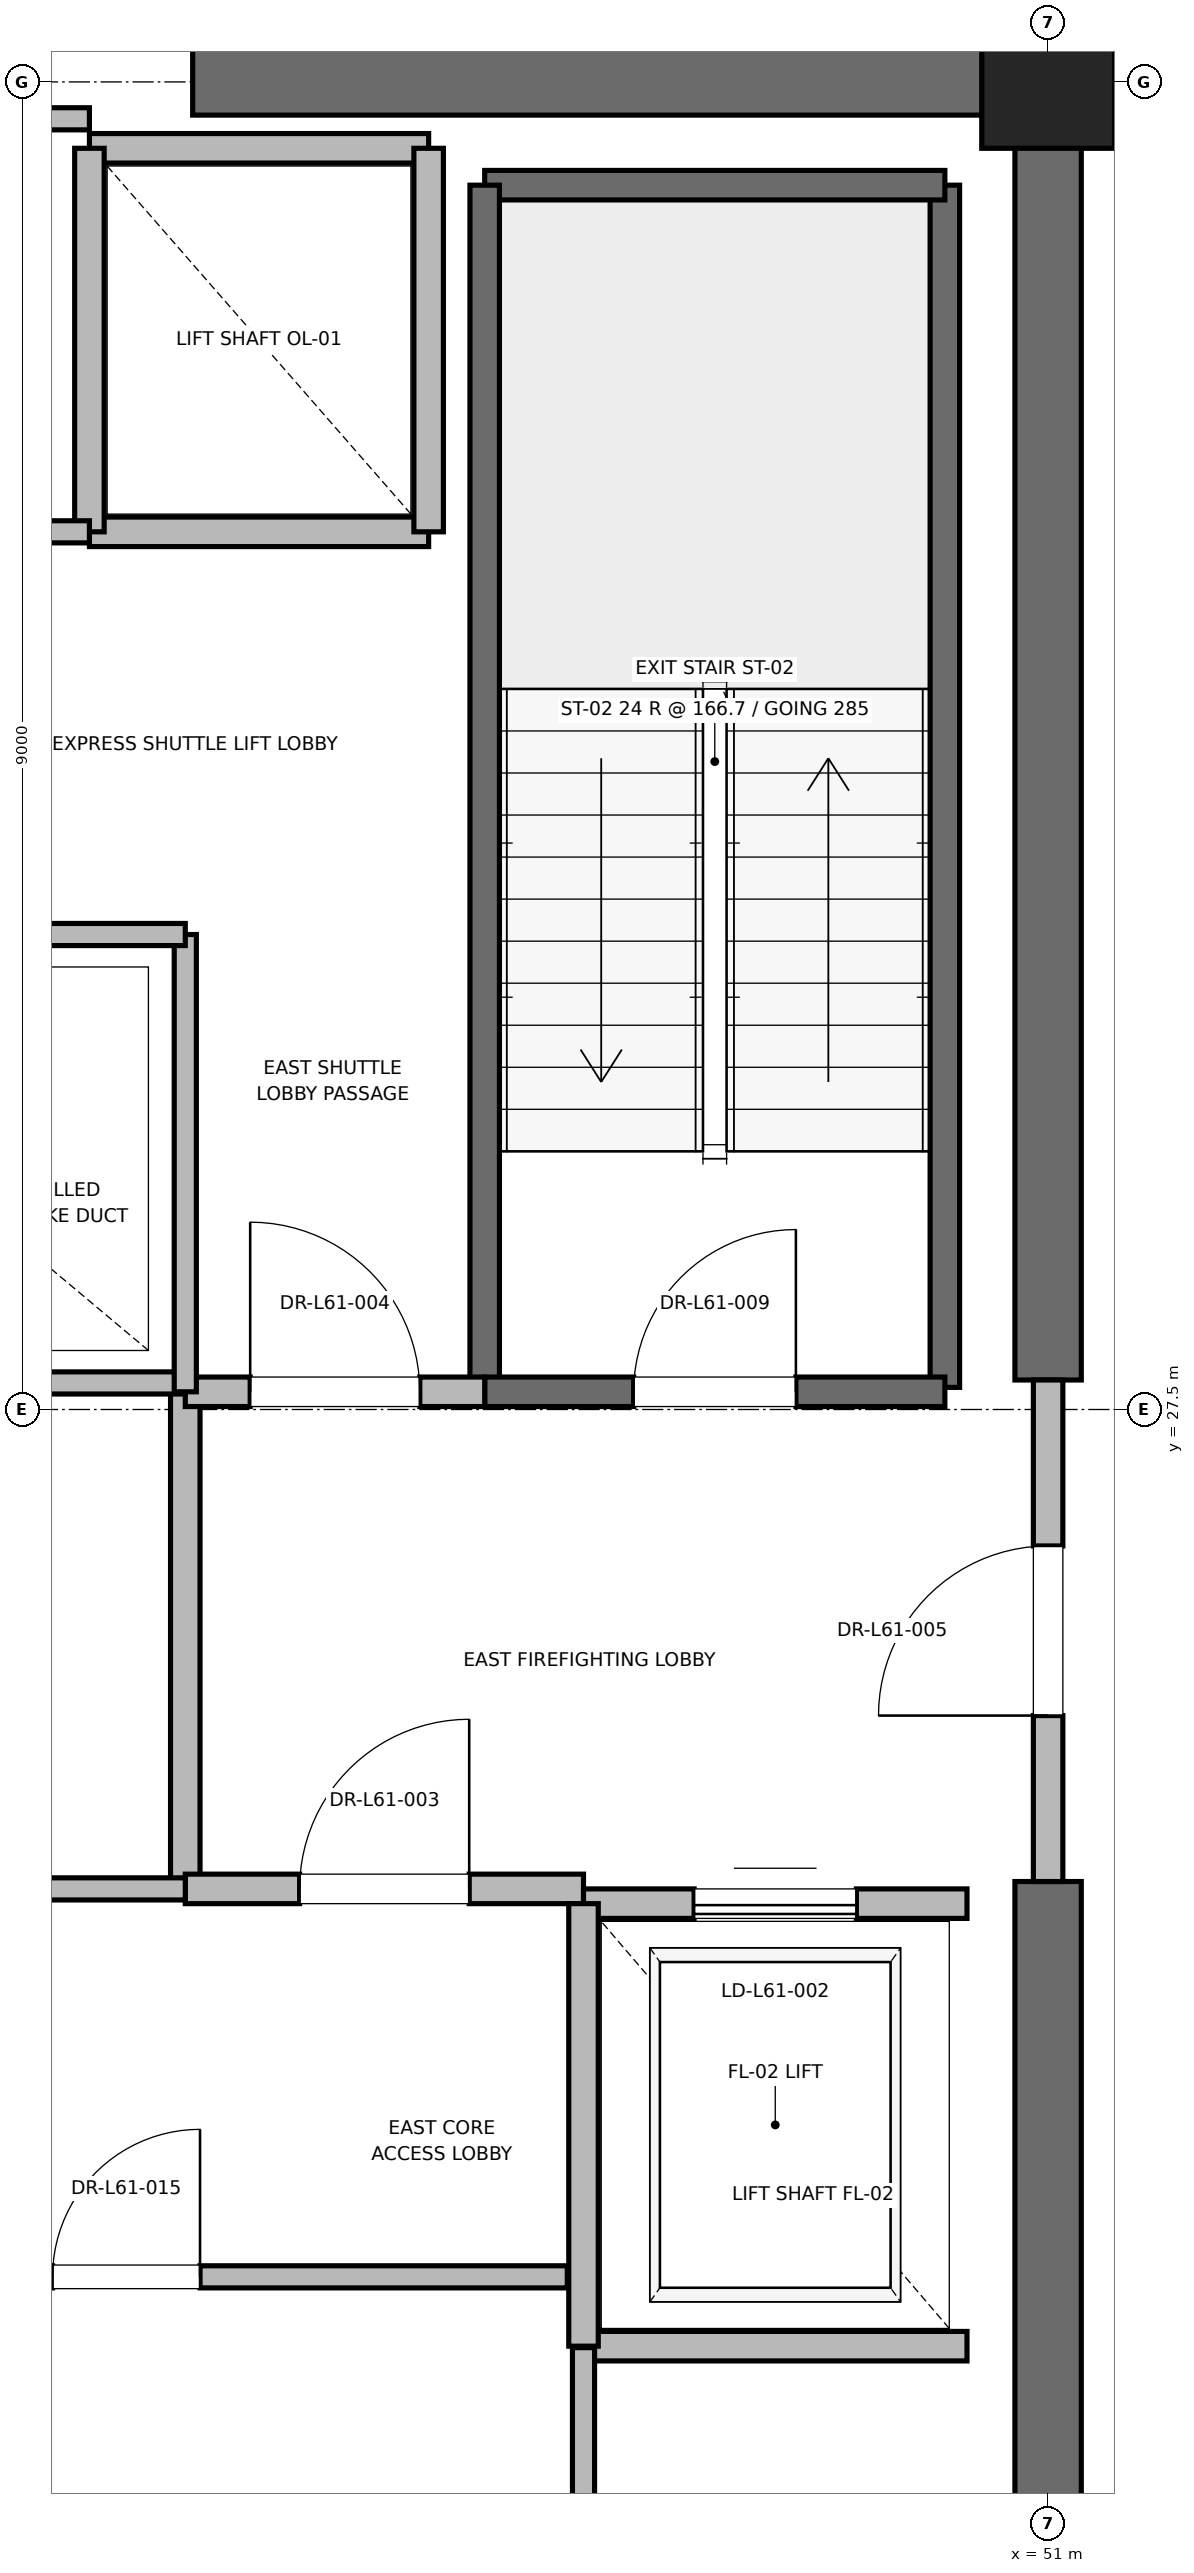
"""IFC4 building model, lengths in metres.
Left out: names, types, materials, properties, quantities, classifications, styles, units other than length and angle.
Written with IfcOpenShell. Run it as: python <this file> out.ifc"""

import sys

from ifc_helpers import new_model, si_unit, direction, frame, frame_2d, origin, origin_2d, place, context, subcontext, project, spatial, rectangle, extrude, element, fill, save


model = new_model("IFC4")
c1 = context("Model", 3, precision=1e-05, world=origin(), true_north=direction((0.0, 1.0)))
c2 = subcontext(c1, "Body", "Model", "MODEL_VIEW")
j1 = project(units=[si_unit("LENGTHUNIT", "METRE"), si_unit("PLANEANGLEUNIT", "RADIAN")], contexts=[c1])
p1 = place(None, origin())
s1 = spatial("IfcSite", under=j1, at=p1, CompositionType="ELEMENT")
p2 = place(p1, origin())
s2 = spatial("IfcBuilding", under=s1, at=p2, CompositionType="ELEMENT")
p3 = place(p2, frame((0.0, 0.0, 263.2)))
s3 = spatial("IfcBuildingStorey", under=s2, at=p3, CompositionType="ELEMENT", Elevation=263.2)
p4 = place(p3, frame((51.0, 36.5, 0.0), z_axis=(0.0, 0.0, 1.0), x_axis=(1.0, 0.0, 0.0)))
e1 = element("IfcColumn", 1, at=p4, inside=s3, PredefinedType="PILASTER", context=c2, shape_type="SweptSolid", body=[
    extrude(rectangle(XDim=0.9, YDim=0.9, at=origin_2d()), origin(), (0.0, 0.0, 1.0), 4.0),
])
for number, where, z_axis, x_axis in (
    (2, (45.2, 36.5, 0.0), (0.0, 0.0, 1.0), (1.0, 0.0, 0.0)),
    (3, (51.0, 18.5, 0.0), (0.0, 0.0, 1.0), (0.0, 1.0, 0.0)),
):
    element("IfcWall", number, at=place(p3, frame(where, z_axis=z_axis, x_axis=x_axis)), inside=s3, PredefinedType="SHEAR", context=c2, shape_type="SweptSolid", body=[
        extrude(rectangle(XDim=5.8, YDim=0.45, at=frame_2d((2.9, 0.0))), origin(), (0.0, 0.0, 1.0), 3.785),
    ])
p5 = place(p3, frame((51.0, 27.7, 0.0), z_axis=(0.0, 0.0, 1.0), x_axis=(0.0, 1.0, 0.0)))
e4 = element("IfcWall", 4, at=p5, inside=s3, PredefinedType="SHEAR", context=c2, shape_type="SweptSolid", body=[
    extrude(rectangle(XDim=8.8, YDim=0.45, at=frame_2d((4.4, 0.0))), origin(), (0.0, 0.0, 1.0), 3.785),
])
p6 = place(p3, frame((50.3, 27.65, 0.0), z_axis=(0.0, 0.0, 1.0), x_axis=(0.0, 1.0, 0.0)))
e5 = element("IfcWall", 5, at=p6, inside=s3, PredefinedType="SOLIDWALL", context=c2, shape_type="SweptSolid", body=[
    extrude(rectangle(XDim=8.15, YDim=0.2, at=frame_2d((4.075, 0.0))), origin(), (0.0, 0.0, 1.0), 3.785),
])
p7 = place(p3, frame((47.18, 35.8, 0.0), z_axis=(0.0, 0.0, 1.0), x_axis=(1.0, 0.0, 0.0)))
e6 = element("IfcWall", 6, at=p7, inside=s3, PredefinedType="SOLIDWALL", context=c2, shape_type="SweptSolid", body=[
    extrude(rectangle(XDim=3.12, YDim=0.2, at=frame_2d((1.56, 0.0))), origin(), (0.0, 0.0, 1.0), 3.785),
])
p8 = place(p3, frame((47.18, 27.62, 0.0), z_axis=(0.0, 0.0, 1.0), x_axis=(0.0, 1.0, 0.0)))
e7 = element("IfcWall", 7, at=p8, inside=s3, PredefinedType="SOLIDWALL", context=c2, shape_type="SweptSolid", body=[
    extrude(rectangle(XDim=8.18, YDim=0.2, at=frame_2d((4.09, 0.0))), origin(), (0.0, 0.0, 1.0), 3.785),
])
p9 = place(p3, frame((47.18, 27.62, 0.0), z_axis=(0.0, 0.0, 1.0), x_axis=(1.0, 0.0, 0.0)))
e8 = element("IfcWall", 8, at=p9, inside=s3, PredefinedType="SOLIDWALL", context=c2, shape_type="SweptSolid", body=[
    extrude(rectangle(XDim=3.12, YDim=0.2, at=frame_2d((1.56, 0.0))), origin(), (0.0, 0.0, 1.0), 3.785),
])
p10 = place(p9, frame((1.01, 0.0, 0.0)))
e9 = element("IfcOpeningElement", 9, at=p10, cuts=e8, PredefinedType="OPENING", context=c2, shape_type="SweptSolid", body=[
    extrude(rectangle(XDim=1.1, YDim=2.15, at=frame_2d((0.55, 1.075))), frame((0.0, 0.1, 0.0), z_axis=(0.0, -1.0, 0.0), x_axis=(1.0, 0.0, 0.0)), (0.0, 0.0, 1.0), 0.2),
])
p11 = place(p3, frame((45.15, 24.25, 0.0), z_axis=(0.0, 0.0, 1.0), x_axis=(0.0, 1.0, 0.0)))
e10 = element("IfcWall", 10, at=p11, inside=s3, PredefinedType="PARTITIONING", context=c2, shape_type="SweptSolid", body=[
    extrude(rectangle(XDim=3.37, YDim=0.2, at=frame_2d((1.685, 0.0))), origin(), (0.0, 0.0, 1.0), 3.785),
])
p12 = place(p3, frame((45.15, 24.25, 0.0), z_axis=(0.0, 0.0, 1.0), x_axis=(1.0, 0.0, 0.0)))
e11 = element("IfcWall", 11, at=p12, inside=s3, PredefinedType="PARTITIONING", context=c2, shape_type="SweptSolid", body=[
    extrude(rectangle(XDim=2.7, YDim=0.2, at=frame_2d((1.35, 0.0))), origin(), (0.0, 0.0, 1.0), 3.785),
])
p13 = place(p12, frame((0.775, 0.0, 0.0)))
e12 = element("IfcOpeningElement", 12, at=p13, cuts=e11, PredefinedType="OPENING", context=c2, shape_type="SweptSolid", body=[
    extrude(rectangle(XDim=1.15, YDim=2.2, at=frame_2d((0.575, 1.1))), frame((0.0, 0.1, 0.0), z_axis=(0.0, -1.0, 0.0), x_axis=(1.0, 0.0, 0.0)), (0.0, 0.0, 1.0), 0.2),
])
p14 = place(p3, frame((45.15, 27.62, 0.0), z_axis=(0.0, 0.0, 1.0), x_axis=(1.0, 0.0, 0.0)))
e13 = element("IfcWall", 13, at=p14, inside=s3, PredefinedType="PARTITIONING", context=c2, shape_type="SweptSolid", body=[
    extrude(rectangle(XDim=2.03, YDim=0.2, at=frame_2d((1.015, 0.0))), origin(), (0.0, 0.0, 1.0), 3.785),
])
p15 = place(p14, frame((0.44, 0.0, 0.0)))
e14 = element("IfcOpeningElement", 14, at=p15, cuts=e13, PredefinedType="OPENING", context=c2, shape_type="SweptSolid", body=[
    extrude(rectangle(XDim=1.15, YDim=2.2, at=frame_2d((0.575, 1.1))), frame((0.0, 0.1, 0.0), z_axis=(0.0, -1.0, 0.0), x_axis=(1.0, 0.0, 0.0)), (0.0, 0.0, 1.0), 0.2),
])
p16 = place(p3, frame((51.0, 24.3, 0.0), z_axis=(0.0, 0.0, 1.0), x_axis=(0.0, 1.0, 0.0)))
e15 = element("IfcWall", 15, at=p16, inside=s3, PredefinedType="PARTITIONING", context=c2, shape_type="SweptSolid", body=[
    extrude(rectangle(XDim=3.4, YDim=0.2, at=frame_2d((1.7, 0.0))), origin(), (0.0, 0.0, 1.0), 2.865),
])
p17 = place(p16, frame((1.125, 0.0, 0.0)))
e16 = element("IfcOpeningElement", 16, at=p17, cuts=e15, PredefinedType="OPENING", context=c2, shape_type="SweptSolid", body=[
    extrude(rectangle(XDim=1.15, YDim=2.2, at=frame_2d((0.575, 1.1))), frame((0.0, 0.1, 0.0), z_axis=(0.0, -1.0, 0.0), x_axis=(1.0, 0.0, 0.0)), (0.0, 0.0, 1.0), 0.2),
])
p18 = place(p3, frame((47.85, 21.15, 0.0), z_axis=(0.0, 0.0, 1.0), x_axis=(1.0, 0.0, 0.0)))
e17 = element("IfcWall", 17, at=p18, inside=s3, PredefinedType="SOLIDWALL", context=c2, shape_type="SweptSolid", body=[
    extrude(rectangle(XDim=2.6, YDim=0.2, at=frame_2d((1.3, 0.0))), origin(), (0.0, 0.0, 1.0), 3.785),
])
p19 = place(p3, frame((50.45, 24.15, 0.0), z_axis=(0.0, 0.0, 1.0), x_axis=(-1.0, 0.0, 0.0)))
e18 = element("IfcWall", 18, at=p19, inside=s3, PredefinedType="SOLIDWALL", context=c2, shape_type="SweptSolid", body=[
    extrude(rectangle(XDim=2.6, YDim=0.2, at=frame_2d((1.3, 0.0))), origin(), (0.0, 0.0, 1.0), 2.865),
])
p20 = place(p19, frame((0.75, 0.0, 0.0)))
e19 = element("IfcOpeningElement", 19, at=p20, cuts=e18, PredefinedType="OPENING", context=c2, shape_type="SweptSolid", body=[
    extrude(rectangle(XDim=1.1, YDim=2.2, at=frame_2d((0.55, 1.1))), frame((0.0, 0.1, 0.0), z_axis=(0.0, -1.0, 0.0), x_axis=(1.0, 0.0, 0.0)), (0.0, 0.0, 1.0), 0.2),
])
p21 = place(p3, frame((47.85, 24.15, 0.0), z_axis=(0.0, 0.0, 1.0), x_axis=(0.0, -1.0, 0.0)))
e20 = element("IfcWall", 20, at=p21, inside=s3, PredefinedType="SOLIDWALL", context=c2, shape_type="SweptSolid", body=[
    extrude(rectangle(XDim=3.0, YDim=0.2, at=frame_2d((1.5, 0.0))), origin(), (0.0, 0.0, 1.0), 3.785),
])
p22 = place(p3, frame((44.5, 33.45, 0.0), z_axis=(0.0, 0.0, 1.0), x_axis=(1.0, 0.0, 0.0)))
e21 = element("IfcWall", 21, at=p22, inside=s3, PredefinedType="SOLIDWALL", context=c2, shape_type="SweptSolid", body=[
    extrude(rectangle(XDim=2.3, YDim=0.2, at=frame_2d((1.15, 0.0))), origin(), (0.0, 0.0, 1.0), 3.785),
])
p23 = place(p3, frame((46.8, 36.05, 0.0), z_axis=(0.0, 0.0, 1.0), x_axis=(-1.0, 0.0, 0.0)))
e22 = element("IfcWall", 22, at=p23, inside=s3, PredefinedType="SOLIDWALL", context=c2, shape_type="SweptSolid", body=[
    extrude(rectangle(XDim=2.3, YDim=0.2, at=frame_2d((1.15, 0.0))), origin(), (0.0, 0.0, 1.0), 2.865),
])
p24 = place(p3, frame((44.5, 36.05, 0.0), z_axis=(0.0, 0.0, 1.0), x_axis=(0.0, -1.0, 0.0)))
e23 = element("IfcWall", 23, at=p24, inside=s3, PredefinedType="SOLIDWALL", context=c2, shape_type="SweptSolid", body=[
    extrude(rectangle(XDim=2.6, YDim=0.2, at=frame_2d((1.3, 0.0))), origin(), (0.0, 0.0, 1.0), 2.865),
])
p25 = place(p3, frame((46.8, 33.45, 0.0), z_axis=(0.0, 0.0, 1.0), x_axis=(0.0, 1.0, 0.0)))
e24 = element("IfcWall", 24, at=p25, inside=s3, PredefinedType="SOLIDWALL", context=c2, shape_type="SweptSolid", body=[
    extrude(rectangle(XDim=2.6, YDim=0.2, at=frame_2d((1.3, 0.0))), origin(), (0.0, 0.0, 1.0), 3.785),
])
p26 = place(p3, frame((41.56, 27.68, 0.0), z_axis=(0.0, 0.0, 1.0), x_axis=(1.0, 0.0, 0.0)))
e25 = element("IfcWall", 25, at=p26, inside=s3, PredefinedType="PARTITIONING", context=c2, shape_type="SweptSolid", body=[
    extrude(rectangle(XDim=3.59, YDim=0.15, at=frame_2d((1.795, 0.0))), origin(), (0.0, 0.0, 1.0), 2.85),
])
p27 = place(p3, frame((47.85, 18.6, 0.0), z_axis=(0.0, 0.0, 1.0), x_axis=(0.0, 1.0, 0.0)))
e26 = element("IfcWall", 26, at=p27, inside=s3, PredefinedType="PARTITIONING", context=c2, shape_type="SweptSolid", body=[
    extrude(rectangle(XDim=2.54, YDim=0.15, at=frame_2d((1.27, 0.0))), origin(), (0.0, 0.0, 1.0), 2.85),
])
p28 = place(p3, frame((41.76, 21.62, 0.0), z_axis=(0.0, 0.0, 1.0), x_axis=(1.0, 0.0, 0.0)))
e27 = element("IfcWall", 27, at=p28, inside=s3, PredefinedType="PARTITIONING", context=c2, shape_type="SweptSolid", body=[
    extrude(rectangle(XDim=5.98, YDim=0.15, at=frame_2d((2.99, 0.0))), origin(), (0.0, 0.0, 1.0), 2.85),
])
p29 = place(p28, frame((2.49, 0.0, 0.0)))
e28 = element("IfcOpeningElement", 28, at=p29, cuts=e27, PredefinedType="OPENING", context=c2, shape_type="SweptSolid", body=[
    extrude(rectangle(XDim=1.0, YDim=2.15, at=frame_2d((0.5, 1.075))), frame((0.0, 0.075, 0.0), z_axis=(0.0, -1.0, 0.0), x_axis=(1.0, 0.0, 0.0)), (0.0, 0.0, 1.0), 0.15),
])
p30 = place(p3, frame((41.76, 24.25, 0.0), z_axis=(0.0, 0.0, 1.0), x_axis=(1.0, 0.0, 0.0)))
e29 = element("IfcWall", 29, at=p30, inside=s3, PredefinedType="PARTITIONING", context=c2, shape_type="SweptSolid", body=[
    extrude(rectangle(XDim=3.39, YDim=0.15, at=frame_2d((1.695, 0.0))), origin(), (0.0, 0.0, 1.0), 2.85),
])
p31 = place(p30, frame((1.195, 0.0, 0.0)))
e30 = element("IfcOpeningElement", 30, at=p31, cuts=e29, PredefinedType="OPENING", context=c2, shape_type="SweptSolid", body=[
    extrude(rectangle(XDim=1.0, YDim=2.15, at=frame_2d((0.5, 1.075))), frame((0.0, 0.075, 0.0), z_axis=(0.0, -1.0, 0.0), x_axis=(1.0, 0.0, 0.0)), (0.0, 0.0, 1.0), 0.15),
])
p32 = place(p3, frame((45.15, 27.62, 0.0), z_axis=(0.0, 0.0, 1.0), x_axis=(0.0, 1.0, 0.0)))
e31 = element("IfcWall", 31, at=p32, inside=s3, PredefinedType="PARTITIONING", context=c2, shape_type="SweptSolid", body=[
    extrude(rectangle(XDim=3.1, YDim=0.15, at=frame_2d((1.55, 0.0))), origin(), (0.0, 0.0, 1.0), 2.85),
])
p33 = place(p3, frame((41.56, 30.72, 0.0), z_axis=(0.0, 0.0, 1.0), x_axis=(1.0, 0.0, 0.0)))
e32 = element("IfcWall", 32, at=p33, inside=s3, PredefinedType="PARTITIONING", context=c2, shape_type="SweptSolid", body=[
    extrude(rectangle(XDim=3.59, YDim=0.15, at=frame_2d((1.795, 0.0))), origin(), (0.0, 0.0, 1.0), 2.85),
])
p34 = place(p33, frame((1.355, 0.0, 0.0)))
e33 = element("IfcOpeningElement", 33, at=p34, cuts=e32, PredefinedType="OPENING", context=c2, shape_type="SweptSolid", body=[
    extrude(rectangle(XDim=0.88, YDim=2.1, at=frame_2d((0.44, 1.05))), frame((0.0, 0.075, 0.0), z_axis=(0.0, -1.0, 0.0), x_axis=(1.0, 0.0, 0.0)), (0.0, 0.0, 1.0), 0.15),
])
p35 = place(p3, frame((41.56, 36.25, 0.0), z_axis=(0.0, 0.0, 1.0), x_axis=(1.0, 0.0, 0.0)))
e34 = element("IfcWall", 34, at=p35, inside=s3, PredefinedType="PARTITIONING", context=c2, shape_type="SweptSolid", body=[
    extrude(rectangle(XDim=2.94, YDim=0.15, at=frame_2d((1.47, 0.0))), origin(), (0.0, 0.0, 1.0), 2.85),
])
p36 = place(p3, frame((41.56, 33.45, 0.0), z_axis=(0.0, 0.0, 1.0), x_axis=(1.0, 0.0, 0.0)))
e35 = element("IfcWall", 35, at=p36, inside=s3, PredefinedType="PARTITIONING", context=c2, shape_type="SweptSolid", body=[
    extrude(rectangle(XDim=2.94, YDim=0.15, at=frame_2d((1.47, 0.0))), origin(), (0.0, 0.0, 1.0), 2.85),
])
p37 = place(p36, frame((1.03, 0.0, 0.0)))
e36 = element("IfcOpeningElement", 36, at=p37, cuts=e35, PredefinedType="OPENING", context=c2, shape_type="SweptSolid", body=[
    extrude(rectangle(XDim=0.88, YDim=2.1, at=frame_2d((0.44, 1.05))), frame((0.0, 0.075, 0.0), z_axis=(0.0, -1.0, 0.0), x_axis=(1.0, 0.0, 0.0)), (0.0, 0.0, 1.0), 0.15),
])
p38 = place(p10, origin())
e37 = element("IfcDoor", 37, at=p38, inside=s3, OperationType="SINGLE_SWING_RIGHT", PredefinedType="DOOR", context=c2, shape_type="SweptSolid", body=[
    extrude(rectangle(XDim=1.1, YDim=2.15, at=frame_2d((0.55, 1.075))), frame((0.0, 0.025, 0.0), z_axis=(0.0, -1.0, 0.0), x_axis=(1.0, 0.0, 0.0)), (0.0, 0.0, 1.0), 0.05),
])
fill(e9, e37)
p39 = place(p13, origin())
e38 = element("IfcDoor", 38, at=p39, inside=s3, OperationType="SINGLE_SWING_RIGHT", PredefinedType="DOOR", context=c2, shape_type="SweptSolid", body=[
    extrude(rectangle(XDim=1.15, YDim=2.2, at=frame_2d((0.575, 1.1))), frame((0.0, 0.025, 0.0), z_axis=(0.0, -1.0, 0.0), x_axis=(1.0, 0.0, 0.0)), (0.0, 0.0, 1.0), 0.05),
])
fill(e12, e38)
p40 = place(p15, origin())
e39 = element("IfcDoor", 39, at=p40, inside=s3, OperationType="SINGLE_SWING_LEFT", PredefinedType="DOOR", context=c2, shape_type="SweptSolid", body=[
    extrude(rectangle(XDim=1.15, YDim=2.2, at=frame_2d((0.575, 1.1))), frame((0.0, 0.025, 0.0), z_axis=(0.0, -1.0, 0.0), x_axis=(1.0, 0.0, 0.0)), (0.0, 0.0, 1.0), 0.05),
])
fill(e14, e39)
p41 = place(p17, origin())
e40 = element("IfcDoor", 40, at=p41, inside=s3, OperationType="SINGLE_SWING_LEFT", PredefinedType="DOOR", context=c2, shape_type="SweptSolid", body=[
    extrude(rectangle(XDim=1.15, YDim=2.2, at=frame_2d((0.575, 1.1))), frame((0.0, 0.025, 0.0), z_axis=(0.0, -1.0, 0.0), x_axis=(1.0, 0.0, 0.0)), (0.0, 0.0, 1.0), 0.05),
])
fill(e16, e40)
p42 = place(p20, origin())
e41 = element("IfcDoor", 41, at=p42, inside=s3, OperationType="SLIDING_TO_RIGHT", PredefinedType="DOOR", context=c2, shape_type="SweptSolid", body=[
    extrude(rectangle(XDim=1.1, YDim=2.2, at=frame_2d((0.55, 1.1))), frame((0.0, 0.025, 0.0), z_axis=(0.0, -1.0, 0.0), x_axis=(1.0, 0.0, 0.0)), (0.0, 0.0, 1.0), 0.05),
])
fill(e19, e41)
p43 = place(p29, origin())
e42 = element("IfcDoor", 42, at=p43, inside=s3, OperationType="SINGLE_SWING_RIGHT", PredefinedType="DOOR", context=c2, shape_type="SweptSolid", body=[
    extrude(rectangle(XDim=1.0, YDim=2.15, at=frame_2d((0.5, 1.075))), frame((0.0, 0.025, 0.0), z_axis=(0.0, -1.0, 0.0), x_axis=(1.0, 0.0, 0.0)), (0.0, 0.0, 1.0), 0.05),
])
fill(e28, e42)
save(model, sys.argv[1])
